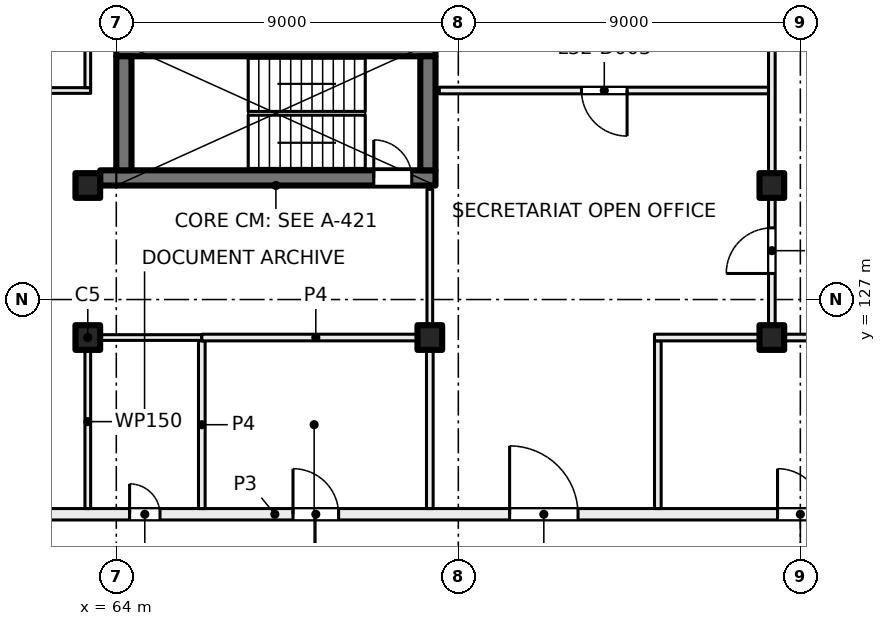
"""IFC4 building model, lengths in metres.
Left out: names, types, materials, properties, quantities, classifications, styles, units other than length and angle.
Written with IfcOpenShell. Run it as: python <this file> out.ifc"""

import sys

from ifc_helpers import new_model, si_unit, direction, frame, frame_2d, origin, origin_2d, place, context, subcontext, project, spatial, rectangle, extrude, element, fill, save


model = new_model("IFC4")
c1 = context("Model", 3, precision=1e-05, world=origin(), true_north=direction((0.0, 1.0)))
c2 = subcontext(c1, "Body", "Model", "MODEL_VIEW")
j1 = project(units=[si_unit("LENGTHUNIT", "METRE"), si_unit("PLANEANGLEUNIT", "RADIAN")], contexts=[c1])
p1 = place(None, origin())
s1 = spatial("IfcSite", under=j1, at=p1, CompositionType="ELEMENT")
p2 = place(p1, origin())
s2 = spatial("IfcBuilding", under=s1, at=p2, CompositionType="ELEMENT")
p3 = place(p2, frame((0.0, 0.0, 138.5)))
s3 = spatial("IfcBuildingStorey", under=s2, at=p3, CompositionType="ELEMENT", Elevation=138.5)
for number, where, z_axis, x_axis in (
    (1, (63.25, 130.0, 0.0), (0.0, 0.0, 1.0), (1.0, 0.0, 0.0)),
    (2, (81.25, 130.0, 0.0), (0.0, 0.0, 1.0), (1.0, 0.0, 0.0)),
    (3, (63.25, 126.0, 0.0), (0.0, 0.0, 1.0), (1.0, 0.0, 0.0)),
    (4, (72.25, 126.0, 0.0), (0.0, 0.0, 1.0), (1.0, 0.0, 0.0)),
    (5, (81.25, 126.0, 0.0), (0.0, 0.0, 1.0), (1.0, 0.0, 0.0)),
):
    element("IfcColumn", number, at=place(p3, frame(where, z_axis=z_axis, x_axis=x_axis)), inside=s3, PredefinedType="COLUMN", context=c2, shape_type="SweptSolid", body=[
        extrude(rectangle(XDim=0.65, YDim=0.65, at=origin_2d()), origin(), (0.0, 0.0, 1.0), 4.0),
    ])
p4 = place(p3, frame((63.575, 130.2, 0.0), z_axis=(0.0, 0.0, 1.0), x_axis=(1.0, 0.0, 0.0)))
e6 = element("IfcWall", 6, at=p4, inside=s3, PredefinedType="SHEAR", context=c2, shape_type="SweptSolid", body=[
    extrude(rectangle(XDim=8.825, YDim=0.4, at=frame_2d((4.413, 0.0))), origin(), (0.0, 0.0, 1.0), 4.0),
])
p5 = place(p4, frame((7.2, 0.0, 0.0)))
e7 = element("IfcOpeningElement", 7, at=p5, cuts=e6, PredefinedType="OPENING", context=c2, shape_type="SweptSolid", body=[
    extrude(rectangle(XDim=1.0, YDim=2.1, at=frame_2d((0.5, 1.05))), frame((0.0, 0.21, 0.0), z_axis=(0.0, -1.0, 0.0), x_axis=(1.0, 0.0, 0.0)), (0.0, 0.0, 1.0), 0.42),
])
p6 = place(p3, frame((64.0, 133.6, 0.0), z_axis=(0.0, 0.0, 1.0), x_axis=(1.0, 0.0, 0.0)))
e8 = element("IfcWall", 8, at=p6, inside=s3, PredefinedType="SHEAR", context=c2, shape_type="SweptSolid", body=[
    extrude(rectangle(XDim=8.4, YDim=0.4, at=frame_2d((4.2, 0.0))), origin(), (0.0, 0.0, 1.0), 4.0),
])
for number, where, z_axis, x_axis in (
    (9, (64.2, 130.4, 0.0), (0.0, 0.0, 1.0), (0.0, 1.0, 0.0)),
    (10, (72.2, 130.4, 0.0), (0.0, 0.0, 1.0), (0.0, 1.0, 0.0)),
):
    element("IfcWall", number, at=place(p3, frame(where, z_axis=z_axis, x_axis=x_axis)), inside=s3, PredefinedType="SHEAR", context=c2, shape_type="SweptSolid", body=[
        extrude(rectangle(XDim=3.0, YDim=0.4, at=frame_2d((1.5, 0.0))), origin(), (0.0, 0.0, 1.0), 4.0),
    ])
p7 = place(p3, frame((50.506, 121.35, 0.0), z_axis=(0.0, 0.0, 1.0), x_axis=(1.0, 0.0, 0.0)))
e11 = element("IfcWall", 11, at=p7, inside=s3, PredefinedType="PARTITIONING", context=c2, shape_type="SweptSolid", body=[
    extrude(rectangle(XDim=35.332, YDim=0.3, at=frame_2d((17.666, 0.0))), origin(), (0.0, 0.0, 1.0), 3.625),
])
p8 = place(p7, frame((30.894, 0.0, 0.0)))
e12 = element("IfcOpeningElement", 12, at=p8, cuts=e11, PredefinedType="OPENING", context=c2, shape_type="SweptSolid", body=[
    extrude(rectangle(XDim=1.2, YDim=2.1, at=frame_2d((0.6, 1.05))), frame((0.0, 0.16, 0.0), z_axis=(0.0, -1.0, 0.0), x_axis=(1.0, 0.0, 0.0)), (0.0, 0.0, 1.0), 0.32),
])
p9 = place(p7, frame((23.844, 0.0, 0.0)))
e13 = element("IfcOpeningElement", 13, at=p9, cuts=e11, PredefinedType="OPENING", context=c2, shape_type="SweptSolid", body=[
    extrude(rectangle(XDim=1.8, YDim=2.1, at=frame_2d((0.9, 1.05))), frame((0.0, 0.16, 0.0), z_axis=(0.0, -1.0, 0.0), x_axis=(1.0, 0.0, 0.0)), (0.0, 0.0, 1.0), 0.32),
])
p10 = place(p7, frame((18.144, 0.0, 0.0)))
e14 = element("IfcOpeningElement", 14, at=p10, cuts=e11, PredefinedType="OPENING", context=c2, shape_type="SweptSolid", body=[
    extrude(rectangle(XDim=1.2, YDim=2.1, at=frame_2d((0.6, 1.05))), frame((0.0, 0.16, 0.0), z_axis=(0.0, -1.0, 0.0), x_axis=(1.0, 0.0, 0.0)), (0.0, 0.0, 1.0), 0.32),
])
p11 = place(p7, frame((13.844, 0.0, 0.0)))
e15 = element("IfcOpeningElement", 15, at=p11, cuts=e11, PredefinedType="OPENING", context=c2, shape_type="SweptSolid", body=[
    extrude(rectangle(XDim=0.8, YDim=2.1, at=frame_2d((0.4, 1.05))), frame((0.0, 0.16, 0.0), z_axis=(0.0, -1.0, 0.0), x_axis=(1.0, 0.0, 0.0)), (0.0, 0.0, 1.0), 0.32),
])
p12 = place(p7, frame((7.344, 0.0, 0.0)))
e16 = element("IfcOpeningElement", 16, at=p12, cuts=e11, PredefinedType="OPENING", context=c2, shape_type="SweptSolid", body=[
    extrude(rectangle(XDim=1.8, YDim=2.1, at=frame_2d((0.9, 1.05))), frame((0.0, 0.16, 0.0), z_axis=(0.0, -1.0, 0.0), x_axis=(1.0, 0.0, 0.0)), (0.0, 0.0, 1.0), 0.32),
])
p13 = place(p7, frame((1.047, 0.0, 0.0)))
e17 = element("IfcOpeningElement", 17, at=p13, cuts=e11, PredefinedType="OPENING", context=c2, shape_type="SweptSolid", body=[
    extrude(rectangle(XDim=1.8, YDim=2.1, at=frame_2d((0.9, 1.05))), frame((0.0, 0.16, 0.0), z_axis=(0.0, -1.0, 0.0), x_axis=(1.0, 0.0, 0.0)), (0.0, 0.0, 1.0), 0.32),
])
p14 = place(p3, frame((63.325, 132.5, 0.0), z_axis=(0.0, 0.0, 1.0), x_axis=(-1.0, 0.0, 0.0)))
e18 = element("IfcWall", 18, at=p14, inside=s3, PredefinedType="PARTITIONING", context=c2, shape_type="SweptSolid", body=[
    extrude(rectangle(XDim=9.0, YDim=0.15, at=frame_2d((4.5, 0.0))), origin(), (0.0, 0.0, 1.0), 3.625),
])
p15 = place(p14, frame((6.298, 0.0, 0.0)))
e19 = element("IfcOpeningElement", 19, at=p15, cuts=e18, PredefinedType="OPENING", context=c2, shape_type="SweptSolid", body=[
    extrude(rectangle(XDim=1.0, YDim=2.1, at=frame_2d((0.5, 1.05))), frame((0.0, 0.085, 0.0), z_axis=(0.0, -1.0, 0.0), x_axis=(1.0, 0.0, 0.0)), (0.0, 0.0, 1.0), 0.17),
])
p16 = place(p3, frame((63.25, 126.075, 0.0), z_axis=(0.0, 0.0, 1.0), x_axis=(0.0, -1.0, 0.0)))
e20 = element("IfcWall", 20, at=p16, inside=s3, PredefinedType="PARTITIONING", context=c2, shape_type="SweptSolid", body=[
    extrude(rectangle(XDim=4.575, YDim=0.15, at=frame_2d((2.288, 0.0))), origin(), (0.0, 0.0, 1.0), 3.625),
])
p17 = place(p3, frame((63.25, 138.4, 0.0), z_axis=(0.0, 0.0, 1.0), x_axis=(0.0, -1.0, 0.0)))
e21 = element("IfcWall", 21, at=p17, inside=s3, PredefinedType="PARTITIONING", context=c2, shape_type="SweptSolid", body=[
    extrude(rectangle(XDim=5.825, YDim=0.15, at=frame_2d((2.913, 0.0))), origin(), (0.0, 0.0, 1.0), 3.625),
])
p18 = place(p17, frame((2.423, 0.0, 0.0)))
e22 = element("IfcOpeningElement", 22, at=p18, cuts=e21, PredefinedType="OPENING", context=c2, shape_type="SweptSolid", body=[
    extrude(rectangle(XDim=1.0, YDim=2.1, at=frame_2d((0.5, 1.05))), frame((0.0, 0.085, 0.0), z_axis=(0.0, -1.0, 0.0), x_axis=(1.0, 0.0, 0.0)), (0.0, 0.0, 1.0), 0.17),
])
p19 = place(p3, frame((66.25, 121.5, 0.0), z_axis=(0.0, 0.0, 1.0), x_axis=(0.0, 1.0, 0.0)))
e23 = element("IfcWall", 23, at=p19, inside=s3, PredefinedType="PARTITIONING", context=c2, shape_type="SweptSolid", body=[
    extrude(rectangle(XDim=4.412, YDim=0.175, at=frame_2d((2.206, 0.0))), origin(), (0.0, 0.0, 1.0), 3.625),
])
p20 = place(p3, frame((66.25, 126.0, 0.0), z_axis=(0.0, 0.0, 1.0), x_axis=(-1.0, 0.0, 0.0)))
e24 = element("IfcWall", 24, at=p20, inside=s3, PredefinedType="PARTITIONING", context=c2, shape_type="SweptSolid", body=[
    extrude(rectangle(XDim=2.925, YDim=0.15, at=frame_2d((1.462, 0.0))), origin(), (0.0, 0.0, 1.0), 3.625),
])
p21 = place(p3, frame((66.25, 126.0, 0.0), z_axis=(0.0, 0.0, 1.0), x_axis=(1.0, 0.0, 0.0)))
e25 = element("IfcWall", 25, at=p21, inside=s3, PredefinedType="PARTITIONING", context=c2, shape_type="SweptSolid", body=[
    extrude(rectangle(XDim=6.0, YDim=0.175, at=frame_2d((3.0, 0.0))), origin(), (0.0, 0.0, 1.0), 3.625),
])
p22 = place(p3, frame((72.25, 121.5, 0.0), z_axis=(0.0, 0.0, 1.0), x_axis=(0.0, 1.0, 0.0)))
e26 = element("IfcWall", 26, at=p22, inside=s3, PredefinedType="PARTITIONING", context=c2, shape_type="SweptSolid", body=[
    extrude(rectangle(XDim=4.428, YDim=0.175, at=frame_2d((2.214, 0.0))), origin(), (0.0, 0.0, 1.0), 3.625),
])
p23 = place(p3, frame((72.25, 126.084, 0.0), z_axis=(0.0, 0.0, 1.0), x_axis=(0.0, 1.0, 0.0)))
e27 = element("IfcWall", 27, at=p23, inside=s3, PredefinedType="PARTITIONING", context=c2, shape_type="SweptSolid", body=[
    extrude(rectangle(XDim=3.816, YDim=0.15, at=frame_2d((1.908, 0.0))), origin(), (0.0, 0.0, 1.0), 3.625),
])
p24 = place(p3, frame((78.25, 125.912, 0.0), z_axis=(0.0, 0.0, 1.0), x_axis=(0.0, -1.0, 0.0)))
e28 = element("IfcWall", 28, at=p24, inside=s3, PredefinedType="PARTITIONING", context=c2, shape_type="SweptSolid", body=[
    extrude(rectangle(XDim=4.412, YDim=0.175, at=frame_2d((2.206, 0.0))), origin(), (0.0, 0.0, 1.0), 3.625),
])
p25 = place(p3, frame((78.162, 126.0, 0.0), z_axis=(0.0, 0.0, 1.0), x_axis=(1.0, 0.0, 0.0)))
e29 = element("IfcWall", 29, at=p25, inside=s3, PredefinedType="PARTITIONING", context=c2, shape_type="SweptSolid", body=[
    extrude(rectangle(XDim=7.5, YDim=0.175, at=frame_2d((3.75, 0.0))), origin(), (0.0, 0.0, 1.0), 3.625),
])
p26 = place(p3, frame((81.25, 126.088, 0.0), z_axis=(0.0, 0.0, 1.0), x_axis=(0.0, 1.0, 0.0)))
e30 = element("IfcWall", 30, at=p26, inside=s3, PredefinedType="PARTITIONING", context=c2, shape_type="SweptSolid", body=[
    extrude(rectangle(XDim=12.312, YDim=0.175, at=frame_2d((6.156, 0.0))), origin(), (0.0, 0.0, 1.0), 3.625),
])
p27 = place(p26, frame((1.597, 0.0, 0.0)))
e31 = element("IfcOpeningElement", 31, at=p27, cuts=e30, PredefinedType="OPENING", context=c2, shape_type="SweptSolid", body=[
    extrude(rectangle(XDim=1.2, YDim=2.1, at=frame_2d((0.6, 1.05))), frame((0.0, 0.097, 0.0), z_axis=(0.0, -1.0, 0.0), x_axis=(1.0, 0.0, 0.0)), (0.0, 0.0, 1.0), 0.195),
])
p28 = place(p3, frame((81.162, 132.5, 0.0), z_axis=(0.0, 0.0, 1.0), x_axis=(-1.0, 0.0, 0.0)))
e32 = element("IfcWall", 32, at=p28, inside=s3, PredefinedType="PARTITIONING", context=c2, shape_type="SweptSolid", body=[
    extrude(rectangle(XDim=8.662, YDim=0.175, at=frame_2d((4.331, 0.0))), origin(), (0.0, 0.0, 1.0), 3.625),
])
p29 = place(p28, frame((3.721, 0.0, 0.0)))
e33 = element("IfcOpeningElement", 33, at=p29, cuts=e32, PredefinedType="OPENING", context=c2, shape_type="SweptSolid", body=[
    extrude(rectangle(XDim=1.2, YDim=2.1, at=frame_2d((0.6, 1.05))), frame((0.0, 0.097, 0.0), z_axis=(0.0, -1.0, 0.0), x_axis=(1.0, 0.0, 0.0)), (0.0, 0.0, 1.0), 0.195),
])
p30 = place(p5, origin())
e34 = element("IfcDoor", 34, at=p30, inside=s3, OperationType="SINGLE_SWING_LEFT", PredefinedType="DOOR", context=c2, shape_type="SweptSolid", body=[
    extrude(rectangle(XDim=1.0, YDim=2.1, at=frame_2d((0.5, 1.05))), frame((0.0, 0.025, 0.0), z_axis=(0.0, -1.0, 0.0), x_axis=(1.0, 0.0, 0.0)), (0.0, 0.0, 1.0), 0.05),
])
fill(e7, e34)
p31 = place(p8, origin())
e35 = element("IfcDoor", 35, at=p31, inside=s3, OperationType="DOUBLE_DOOR_SINGLE_SWING", PredefinedType="DOOR", context=c2, shape_type="SweptSolid", body=[
    extrude(rectangle(XDim=1.2, YDim=2.1, at=frame_2d((0.6, 1.05))), frame((0.0, 0.025, 0.0), z_axis=(0.0, -1.0, 0.0), x_axis=(1.0, 0.0, 0.0)), (0.0, 0.0, 1.0), 0.05),
])
fill(e12, e35)
p32 = place(p29, origin())
e36 = element("IfcDoor", 36, at=p32, inside=s3, OperationType="DOUBLE_DOOR_SINGLE_SWING", PredefinedType="DOOR", context=c2, shape_type="SweptSolid", body=[
    extrude(rectangle(XDim=1.2, YDim=2.1, at=frame_2d((0.6, 1.05))), frame((0.0, 0.025, 0.0), z_axis=(0.0, -1.0, 0.0), x_axis=(1.0, 0.0, 0.0)), (0.0, 0.0, 1.0), 0.05),
])
fill(e33, e36)
p33 = place(p9, origin())
e37 = element("IfcDoor", 37, at=p33, inside=s3, OperationType="DOUBLE_DOOR_SINGLE_SWING", PredefinedType="DOOR", context=c2, shape_type="SweptSolid", body=[
    extrude(rectangle(XDim=1.8, YDim=2.1, at=frame_2d((0.9, 1.05))), frame((0.0, 0.025, 0.0), z_axis=(0.0, -1.0, 0.0), x_axis=(1.0, 0.0, 0.0)), (0.0, 0.0, 1.0), 0.05),
])
fill(e13, e37)
p34 = place(p10, origin())
e38 = element("IfcDoor", 38, at=p34, inside=s3, OperationType="DOUBLE_DOOR_SINGLE_SWING", PredefinedType="DOOR", context=c2, shape_type="SweptSolid", body=[
    extrude(rectangle(XDim=1.2, YDim=2.1, at=frame_2d((0.6, 1.05))), frame((0.0, 0.025, 0.0), z_axis=(0.0, -1.0, 0.0), x_axis=(1.0, 0.0, 0.0)), (0.0, 0.0, 1.0), 0.05),
])
fill(e14, e38)
p35 = place(p11, origin())
e39 = element("IfcDoor", 39, at=p35, inside=s3, OperationType="SINGLE_SWING_LEFT", PredefinedType="DOOR", context=c2, shape_type="SweptSolid", body=[
    extrude(rectangle(XDim=0.8, YDim=2.1, at=frame_2d((0.4, 1.05))), frame((0.0, 0.025, 0.0), z_axis=(0.0, -1.0, 0.0), x_axis=(1.0, 0.0, 0.0)), (0.0, 0.0, 1.0), 0.05),
])
fill(e15, e39)
p36 = place(p27, origin())
e40 = element("IfcDoor", 40, at=p36, inside=s3, OperationType="DOUBLE_DOOR_SINGLE_SWING", PredefinedType="DOOR", context=c2, shape_type="SweptSolid", body=[
    extrude(rectangle(XDim=1.2, YDim=2.1, at=frame_2d((0.6, 1.05))), frame((0.0, 0.025, 0.0), z_axis=(0.0, -1.0, 0.0), x_axis=(1.0, 0.0, 0.0)), (0.0, 0.0, 1.0), 0.05),
])
fill(e31, e40)
save(model, sys.argv[1])
